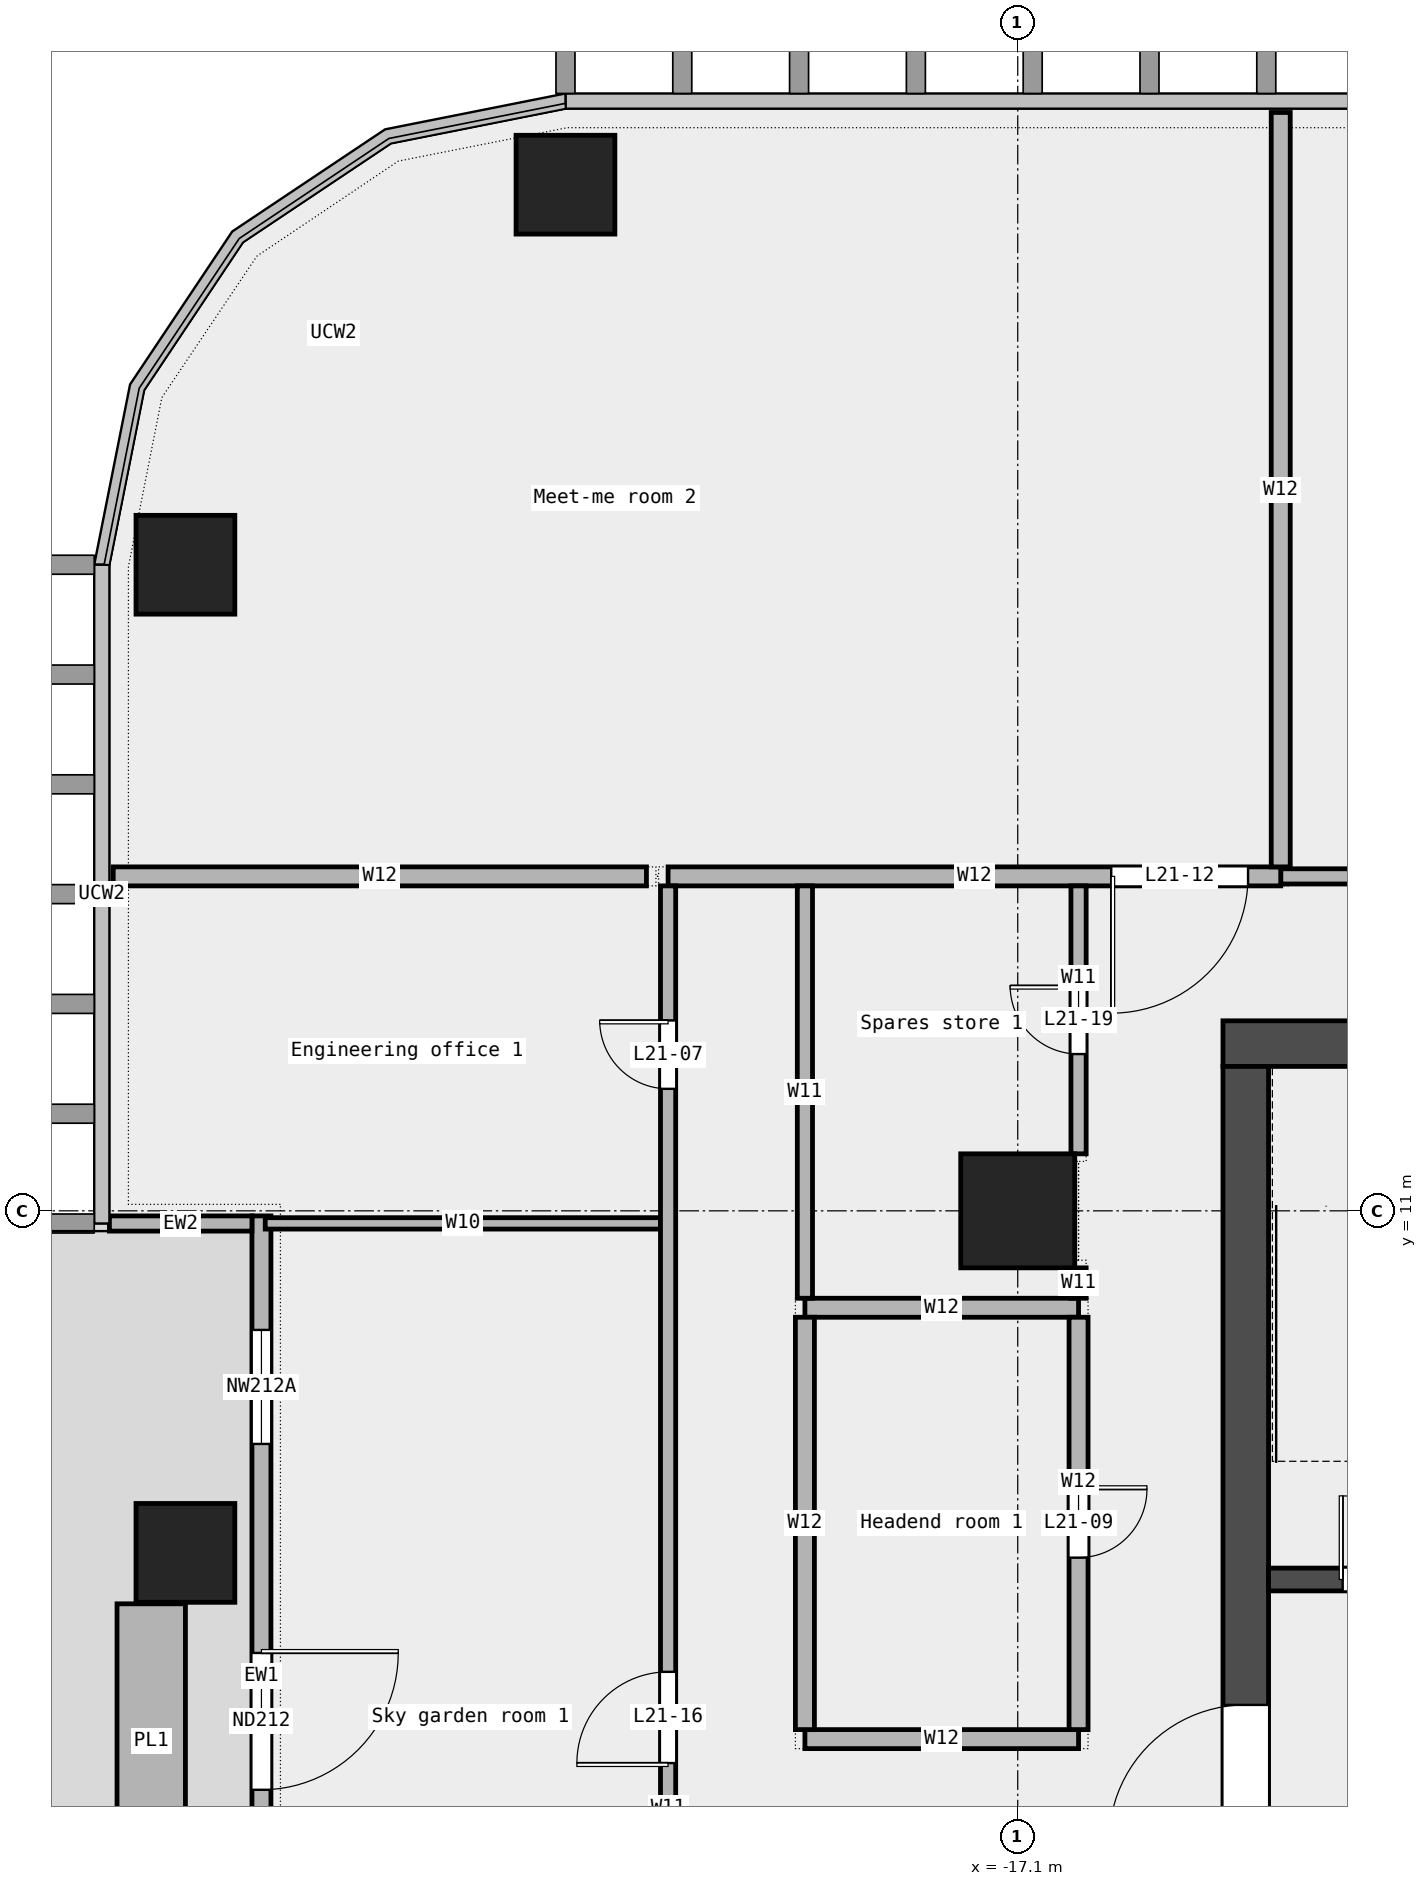
"""IFC4 building model, lengths in metres.
Left out: names, types, materials, properties, quantities, classifications, styles, units other than length and angle.
Written with IfcOpenShell. Run it as: python <this file> out.ifc"""

import sys

from ifc_helpers import new_model, si_unit, direction, frame, frame_2d, origin, origin_2d, place, context, subcontext, project, spatial, rectangle, extrude, element, fill, save


model = new_model("IFC4")
c1 = context("Model", 3, precision=1e-05, world=origin(), true_north=direction((0.0, 1.0)))
c2 = subcontext(c1, "Body", "Model", "MODEL_VIEW")
j1 = project(units=[si_unit("LENGTHUNIT", "METRE"), si_unit("PLANEANGLEUNIT", "RADIAN")], contexts=[c1])
p1 = place(None, origin())
s1 = spatial("IfcSite", under=j1, at=p1, CompositionType="ELEMENT")
p2 = place(p1, origin())
s2 = spatial("IfcBuilding", under=s1, at=p2, CompositionType="ELEMENT")
p3 = place(p2, frame((0.0, 0.0, 108.1)))
s3 = spatial("IfcBuildingStorey", under=s2, at=p3, CompositionType="ELEMENT", Elevation=108.1)
for number, where, z_axis, x_axis in (
    (1, (-23.05, 24.5, 0.0), (0.0, 0.0, 1.0), (1.0, 0.0, 0.0)),
    (2, (-28.05, 19.5, 0.0), (0.0, 0.0, 1.0), (1.0, 0.0, 0.0)),
    (3, (-28.05, 6.5, 0.0), (0.0, 0.0, 1.0), (1.0, 0.0, 0.0)),
):
    element("IfcColumn", number, at=place(p3, frame(where, z_axis=z_axis, x_axis=x_axis)), inside=s3, PredefinedType="COLUMN", context=c2, shape_type="SweptSolid", body=[
        extrude(rectangle(XDim=1.3, YDim=1.3, at=origin_2d()), origin(), (0.0, 0.0, 1.0), 4.05),
    ])
p4 = place(p3, frame((-17.1, 11.0, 0.0), z_axis=(0.0, 0.0, 1.0), x_axis=(1.0, 0.0, 0.0)))
e4 = element("IfcColumn", 4, at=p4, inside=s3, PredefinedType="COLUMN", context=c2, shape_type="SweptSolid", body=[
    extrude(rectangle(XDim=1.5, YDim=1.5, at=origin_2d()), origin(), (0.0, 0.0, 1.0), 4.05),
])
p5 = place(p3, frame((-27.05, 10.933, 0.0), z_axis=(0.0, 0.0, 1.0), x_axis=(0.0, -1.0, 0.0)))
e5 = element("IfcWall", 5, at=p5, inside=s3, PredefinedType="STANDARD", context=c2, shape_type="SweptSolid", body=[
    extrude(rectangle(XDim=13.2, YDim=0.25, at=frame_2d((6.6, 0.0))), origin(), (0.0, 0.0, 1.0), 4.05),
])
p6 = place(p5, frame((1.5, 0.0, 0.45)))
e6 = element("IfcOpeningElement", 6, at=p6, cuts=e5, PredefinedType="OPENING", context=c2, shape_type="SweptSolid", body=[
    extrude(rectangle(XDim=1.5, YDim=3.0, at=frame_2d((0.75, 1.5))), frame((0.0, 0.137, 0.0), z_axis=(0.0, -1.0, 0.0), x_axis=(1.0, 0.0, 0.0)), (0.0, 0.0, 1.0), 0.274),
])
p7 = place(p5, frame((5.75, 0.0, 0.0)))
e7 = element("IfcOpeningElement", 7, at=p7, cuts=e5, PredefinedType="OPENING", context=c2, shape_type="SweptSolid", body=[
    extrude(rectangle(XDim=1.8, YDim=2.4, at=frame_2d((0.9, 1.2))), frame((0.0, 0.137, 0.0), z_axis=(0.0, -1.0, 0.0), x_axis=(1.0, 0.0, 0.0)), (0.0, 0.0, 1.0), 0.274),
])
p8 = place(p5, frame((10.25, 0.0, 0.45)))
e8 = element("IfcOpeningElement", 8, at=p8, cuts=e5, PredefinedType="OPENING", context=c2, shape_type="SweptSolid", body=[
    extrude(rectangle(XDim=1.5, YDim=3.0, at=frame_2d((0.75, 1.5))), frame((0.0, 0.137, 0.0), z_axis=(0.0, -1.0, 0.0), x_axis=(1.0, 0.0, 0.0)), (0.0, 0.0, 1.0), 0.274),
])
p9 = place(p3, frame((-29.05, 10.833, 0.0), z_axis=(0.0, 0.0, 1.0), x_axis=(1.0, 0.0, 0.0)))
e9 = element("IfcWall", 9, at=p9, inside=s3, PredefinedType="STANDARD", context=c2, shape_type="SweptSolid", body=[
    extrude(rectangle(XDim=1.875, YDim=0.2, at=frame_2d((0.938, 0.0))), origin(), (0.0, 0.0, 1.0), 4.05),
])
p10 = place(p3, frame((-28.5, 5.83, 0.0), z_axis=(0.0, 0.0, 1.0), x_axis=(0.0, -1.0, 0.0)))
e10 = element("IfcWall", 10, at=p10, inside=s3, PredefinedType="STANDARD", context=c2, shape_type="SweptSolid", body=[
    extrude(rectangle(XDim=3.6, YDim=0.9, at=frame_2d((1.8, 0.0))), origin(), (0.0, 0.0, 1.0), 0.7),
])
for number, where, z_axis, x_axis in (
    (11, (-19.9, 4.05, 0.0), (0.0, 0.0, 1.0), (1.0, 0.0, 0.0)),
    (12, (-19.9, 9.725, 0.0), (0.0, 0.0, 1.0), (1.0, 0.0, 0.0)),
):
    element("IfcWall", number, at=place(p3, frame(where, z_axis=z_axis, x_axis=x_axis)), inside=s3, PredefinedType="PARTITIONING", context=c2, shape_type="SweptSolid", body=[
        extrude(rectangle(XDim=3.6, YDim=0.25, at=frame_2d((1.8, 0.0))), origin(), (0.0, 0.0, 1.0), 4.05),
    ])
p11 = place(p3, frame((-27.0, 10.835, 0.0), z_axis=(0.0, 0.0, 1.0), x_axis=(1.0, 0.0, 0.0)))
e13 = element("IfcWall", 13, at=p11, inside=s3, PredefinedType="PARTITIONING", context=c2, shape_type="SweptSolid", body=[
    extrude(rectangle(XDim=5.2, YDim=0.15, at=frame_2d((2.6, 0.0))), origin(), (0.0, 0.0, 1.0), 4.05),
])
p12 = place(p3, frame((-13.64, 15.4, 0.0), z_axis=(0.0, 0.0, 1.0), x_axis=(1.0, 0.0, 0.0)))
e14 = element("IfcWall", 14, at=p12, inside=s3, PredefinedType="PARTITIONING", context=c2, shape_type="SweptSolid", body=[
    extrude(rectangle(XDim=12.125, YDim=0.2, at=frame_2d((6.062, 0.0))), origin(), (0.0, 0.0, 1.0), 4.05),
])
p13 = place(p12, frame((5.312, 0.0, 0.0)))
e15 = element("IfcOpeningElement", 15, at=p13, cuts=e14, PredefinedType="OPENING", context=c2, shape_type="SweptSolid", body=[
    extrude(rectangle(XDim=1.5, YDim=2.1, at=frame_2d((0.75, 1.05))), frame((0.0, 0.112, 0.0), z_axis=(0.0, -1.0, 0.0), x_axis=(1.0, 0.0, 0.0)), (0.0, 0.0, 1.0), 0.224),
])
p14 = place(p3, frame((-29.0, 15.4, 0.0), z_axis=(0.0, 0.0, 1.0), x_axis=(1.0, 0.0, 0.0)))
e16 = element("IfcWall", 16, at=p14, inside=s3, PredefinedType="PARTITIONING", context=c2, shape_type="SweptSolid", body=[
    extrude(rectangle(XDim=7.015, YDim=0.25, at=frame_2d((3.507, 0.0))), origin(), (0.0, 0.0, 1.0), 4.05),
])
p15 = place(p3, frame((-21.7, 15.4, 0.0), z_axis=(0.0, 0.0, 1.0), x_axis=(1.0, 0.0, 0.0)))
e17 = element("IfcWall", 17, at=p15, inside=s3, PredefinedType="PARTITIONING", context=c2, shape_type="SweptSolid", body=[
    extrude(rectangle(XDim=8.06, YDim=0.25, at=frame_2d((4.03, 0.0))), origin(), (0.0, 0.0, 1.0), 4.05),
])
p16 = place(p15, frame((5.83, 0.0, 0.0)))
e18 = element("IfcOpeningElement", 18, at=p16, cuts=e17, PredefinedType="OPENING", context=c2, shape_type="SweptSolid", body=[
    extrude(rectangle(XDim=1.8, YDim=2.1, at=frame_2d((0.9, 1.05))), frame((0.0, 0.137, 0.0), z_axis=(0.0, -1.0, 0.0), x_axis=(1.0, 0.0, 0.0)), (0.0, 0.0, 1.0), 0.274),
])
p17 = place(p3, frame((-21.7, -8.975, 0.0), z_axis=(0.0, 0.0, 1.0), x_axis=(0.0, 1.0, 0.0)))
e19 = element("IfcWall", 19, at=p17, inside=s3, PredefinedType="PARTITIONING", context=c2, shape_type="SweptSolid", body=[
    extrude(rectangle(XDim=24.25, YDim=0.2, at=frame_2d((12.125, 0.0))), origin(), (0.0, 0.0, 1.0), 4.05),
])
p18 = place(p17, frame((2.805, 0.0, 0.0)))
e20 = element("IfcOpeningElement", 20, at=p18, cuts=e19, PredefinedType="OPENING", context=c2, shape_type="SweptSolid", body=[
    extrude(rectangle(XDim=1.2, YDim=2.1, at=frame_2d((0.6, 1.05))), frame((0.0, 0.112, 0.0), z_axis=(0.0, -1.0, 0.0), x_axis=(1.0, 0.0, 0.0)), (0.0, 0.0, 1.0), 0.224),
])
p19 = place(p17, frame((21.58, 0.0, 0.0)))
e21 = element("IfcOpeningElement", 21, at=p19, cuts=e19, PredefinedType="OPENING", context=c2, shape_type="SweptSolid", body=[
    extrude(rectangle(XDim=0.9, YDim=2.1, at=frame_2d((0.45, 1.05))), frame((0.0, 0.112, 0.0), z_axis=(0.0, -1.0, 0.0), x_axis=(1.0, 0.0, 0.0)), (0.0, 0.0, 1.0), 0.224),
])
p20 = place(p17, frame((12.71, 0.0, 0.0)))
e22 = element("IfcOpeningElement", 22, at=p20, cuts=e19, PredefinedType="OPENING", context=c2, shape_type="SweptSolid", body=[
    extrude(rectangle(XDim=1.2, YDim=2.1, at=frame_2d((0.6, 1.05))), frame((0.0, 0.112, 0.0), z_axis=(0.0, -1.0, 0.0), x_axis=(1.0, 0.0, 0.0)), (0.0, 0.0, 1.0), 0.224),
])
p21 = place(p3, frame((-19.9, 9.85, 0.0), z_axis=(0.0, 0.0, 1.0), x_axis=(0.0, 1.0, 0.0)))
e23 = element("IfcWall", 23, at=p21, inside=s3, PredefinedType="PARTITIONING", context=c2, shape_type="SweptSolid", body=[
    extrude(rectangle(XDim=5.425, YDim=0.2, at=frame_2d((2.712, 0.0))), origin(), (0.0, 0.0, 1.0), 4.05),
])
p22 = place(p3, frame((-19.9, 4.175, 0.0), z_axis=(0.0, 0.0, 1.0), x_axis=(0.0, 1.0, 0.0)))
e24 = element("IfcWall", 24, at=p22, inside=s3, PredefinedType="PARTITIONING", context=c2, shape_type="SweptSolid", body=[
    extrude(rectangle(XDim=5.425, YDim=0.25, at=frame_2d((2.712, 0.0))), origin(), (0.0, 0.0, 1.0), 4.05),
])
p23 = place(p3, frame((-16.3, 9.85, 0.0), z_axis=(0.0, 0.0, 1.0), x_axis=(0.0, 1.0, 0.0)))
e25 = element("IfcWall", 25, at=p23, inside=s3, PredefinedType="PARTITIONING", context=c2, shape_type="SweptSolid", body=[
    extrude(rectangle(XDim=0.4, YDim=0.2, at=frame_2d((0.2, 0.0))), origin(), (0.0, 0.0, 1.0), 4.05),
])
p24 = place(p3, frame((-16.3, 11.75, 0.0), z_axis=(0.0, 0.0, 1.0), x_axis=(0.0, 1.0, 0.0)))
e26 = element("IfcWall", 26, at=p24, inside=s3, PredefinedType="PARTITIONING", context=c2, shape_type="SweptSolid", body=[
    extrude(rectangle(XDim=3.525, YDim=0.2, at=frame_2d((1.762, 0.0))), origin(), (0.0, 0.0, 1.0), 4.05),
])
p25 = place(p24, frame((1.312, 0.0, 0.0)))
e27 = element("IfcOpeningElement", 27, at=p25, cuts=e26, PredefinedType="OPENING", context=c2, shape_type="SweptSolid", body=[
    extrude(rectangle(XDim=0.9, YDim=2.1, at=frame_2d((0.45, 1.05))), frame((0.0, 0.112, 0.0), z_axis=(0.0, -1.0, 0.0), x_axis=(1.0, 0.0, 0.0)), (0.0, 0.0, 1.0), 0.224),
])
p26 = place(p3, frame((-16.3, 4.175, 0.0), z_axis=(0.0, 0.0, 1.0), x_axis=(0.0, 1.0, 0.0)))
e28 = element("IfcWall", 28, at=p26, inside=s3, PredefinedType="PARTITIONING", context=c2, shape_type="SweptSolid", body=[
    extrude(rectangle(XDim=5.425, YDim=0.25, at=frame_2d((2.712, 0.0))), origin(), (0.0, 0.0, 1.0), 4.05),
])
p27 = place(p26, frame((2.262, 0.0, 0.0)))
e29 = element("IfcOpeningElement", 29, at=p27, cuts=e28, PredefinedType="OPENING", context=c2, shape_type="SweptSolid", body=[
    extrude(rectangle(XDim=0.9, YDim=2.1, at=frame_2d((0.45, 1.05))), frame((0.0, 0.137, 0.0), z_axis=(0.0, -1.0, 0.0), x_axis=(1.0, 0.0, 0.0)), (0.0, 0.0, 1.0), 0.274),
])
p28 = place(p3, frame((-13.64, 15.525, 0.0), z_axis=(0.0, 0.0, 1.0), x_axis=(0.0, 1.0, 0.0)))
e30 = element("IfcWall", 30, at=p28, inside=s3, PredefinedType="PARTITIONING", context=c2, shape_type="SweptSolid", body=[
    extrude(rectangle(XDim=9.925, YDim=0.25, at=frame_2d((4.962, 0.0))), origin(), (0.0, 0.0, 1.0), 4.05),
])
p29 = place(p3, frame((-14.4, 13.2, 0.0), z_axis=(0.0, 0.0, 1.0), x_axis=(1.0, 0.0, 0.0)))
e31 = element("IfcWall", 31, at=p29, inside=s3, PredefinedType="SHEAR", context=c2, shape_type="SweptSolid", body=[
    extrude(rectangle(XDim=28.8, YDim=0.6, at=frame_2d((14.4, 0.0))), origin(), (0.0, 0.0, 1.0), 4.2),
])
p30 = place(p29, frame((6.775, 0.0, 0.0)))
e32 = element("IfcOpeningElement", 32, at=p30, cuts=e31, PredefinedType="OPENING", context=c2, shape_type="SweptSolid", body=[
    extrude(rectangle(XDim=1.0, YDim=2.1, at=frame_2d((0.5, 1.05))), frame((0.0, 0.312, 0.0), z_axis=(0.0, -1.0, 0.0), x_axis=(1.0, 0.0, 0.0)), (0.0, 0.0, 1.0), 0.624),
])
p31 = place(p29, frame((13.525, 0.0, 0.0)))
e33 = element("IfcOpeningElement", 33, at=p31, cuts=e31, PredefinedType="OPENING", context=c2, shape_type="SweptSolid", body=[
    extrude(rectangle(XDim=1.0, YDim=2.1, at=frame_2d((0.5, 1.05))), frame((0.0, 0.312, 0.0), z_axis=(0.0, -1.0, 0.0), x_axis=(1.0, 0.0, 0.0)), (0.0, 0.0, 1.0), 0.624),
])
p32 = place(p29, frame((20.65, 0.0, 0.0)))
e34 = element("IfcOpeningElement", 34, at=p32, cuts=e31, PredefinedType="OPENING", context=c2, shape_type="SweptSolid", body=[
    extrude(rectangle(XDim=1.0, YDim=2.1, at=frame_2d((0.5, 1.05))), frame((0.0, 0.312, 0.0), z_axis=(0.0, -1.0, 0.0), x_axis=(1.0, 0.0, 0.0)), (0.0, 0.0, 1.0), 0.624),
])
p33 = place(p3, frame((-14.1, -6.6, 0.0), z_axis=(0.0, 0.0, 1.0), x_axis=(0.0, 1.0, 0.0)))
e35 = element("IfcWall", 35, at=p33, inside=s3, PredefinedType="SHEAR", context=c2, shape_type="SweptSolid", body=[
    extrude(rectangle(XDim=19.5, YDim=0.6, at=frame_2d((9.75, 0.0))), origin(), (0.0, 0.0, 1.0), 4.2),
])
p34 = place(p33, frame((9.3, 0.0, 0.0)))
e36 = element("IfcOpeningElement", 36, at=p34, cuts=e35, PredefinedType="OPENING", context=c2, shape_type="SweptSolid", body=[
    extrude(rectangle(XDim=1.8, YDim=2.1, at=frame_2d((0.9, 1.05))), frame((0.0, 0.312, 0.0), z_axis=(0.0, -1.0, 0.0), x_axis=(1.0, 0.0, 0.0)), (0.0, 0.0, 1.0), 0.624),
])
p35 = place(p3, frame((-13.8, 6.15, 0.0), z_axis=(0.0, 0.0, 1.0), x_axis=(1.0, 0.0, 0.0)))
e37 = element("IfcWall", 37, at=p35, inside=s3, PredefinedType="SOLIDWALL", context=c2, shape_type="SweptSolid", body=[
    extrude(rectangle(XDim=3.15, YDim=0.3, at=frame_2d((1.575, 0.0))), origin(), (0.0, 0.0, 1.0), 4.2),
])
p36 = place(p35, frame((0.975, 0.0, 0.0)))
e38 = element("IfcOpeningElement", 38, at=p36, cuts=e37, PredefinedType="OPENING", context=c2, shape_type="SweptSolid", body=[
    extrude(rectangle(XDim=1.1, YDim=2.1, at=frame_2d((0.55, 1.05))), frame((0.0, 0.162, 0.0), z_axis=(0.0, -1.0, 0.0), x_axis=(1.0, 0.0, 0.0)), (0.0, 0.0, 1.0), 0.324),
])
p37 = place(p6, origin())
e39 = element("IfcWindow", 39, at=p37, inside=s3, PartitioningType="SINGLE_PANEL", PredefinedType="WINDOW", context=c2, shape_type="SweptSolid", body=[
    extrude(rectangle(XDim=1.5, YDim=3.0, at=frame_2d((0.75, 1.5))), frame((0.0, 0.03, 0.0), z_axis=(0.0, -1.0, 0.0), x_axis=(1.0, 0.0, 0.0)), (0.0, 0.0, 1.0), 0.06),
])
fill(e6, e39)
p38 = place(p7, origin())
e40 = element("IfcDoor", 40, at=p38, inside=s3, OperationType="DOUBLE_DOOR_SINGLE_SWING", PredefinedType="DOOR", context=c2, shape_type="SweptSolid", body=[
    extrude(rectangle(XDim=1.8, YDim=2.4, at=frame_2d((0.9, 1.2))), frame((0.0, 0.025, 0.0), z_axis=(0.0, -1.0, 0.0), x_axis=(1.0, 0.0, 0.0)), (0.0, 0.0, 1.0), 0.05),
])
fill(e7, e40)
p39 = place(p19, origin())
e41 = element("IfcDoor", 41, at=p39, inside=s3, OperationType="SINGLE_SWING_RIGHT", PredefinedType="DOOR", context=c2, shape_type="SweptSolid", body=[
    extrude(rectangle(XDim=0.9, YDim=2.1, at=frame_2d((0.45, 1.05))), frame((0.0, 0.025, 0.0), z_axis=(0.0, -1.0, 0.0), x_axis=(1.0, 0.0, 0.0)), (0.0, 0.0, 1.0), 0.05),
])
fill(e21, e41)
p40 = place(p27, origin())
e42 = element("IfcDoor", 42, at=p40, inside=s3, OperationType="SINGLE_SWING_LEFT", PredefinedType="DOOR", context=c2, shape_type="SweptSolid", body=[
    extrude(rectangle(XDim=0.9, YDim=2.1, at=frame_2d((0.45, 1.05))), frame((0.0, 0.025, 0.0), z_axis=(0.0, -1.0, 0.0), x_axis=(1.0, 0.0, 0.0)), (0.0, 0.0, 1.0), 0.05),
])
fill(e29, e42)
p41 = place(p16, origin())
e43 = element("IfcDoor", 43, at=p41, inside=s3, OperationType="DOUBLE_DOOR_SINGLE_SWING", PredefinedType="DOOR", context=c2, shape_type="SweptSolid", body=[
    extrude(rectangle(XDim=1.8, YDim=2.1, at=frame_2d((0.9, 1.05))), frame((0.0, 0.025, 0.0), z_axis=(0.0, -1.0, 0.0), x_axis=(1.0, 0.0, 0.0)), (0.0, 0.0, 1.0), 0.05),
])
fill(e18, e43)
p42 = place(p20, origin())
e44 = element("IfcDoor", 44, at=p42, inside=s3, OperationType="SINGLE_SWING_LEFT", PredefinedType="DOOR", context=c2, shape_type="SweptSolid", body=[
    extrude(rectangle(XDim=1.2, YDim=2.1, at=frame_2d((0.6, 1.05))), frame((0.0, 0.025, 0.0), z_axis=(0.0, -1.0, 0.0), x_axis=(1.0, 0.0, 0.0)), (0.0, 0.0, 1.0), 0.05),
])
fill(e22, e44)
p43 = place(p25, origin())
e45 = element("IfcDoor", 45, at=p43, inside=s3, OperationType="SINGLE_SWING_RIGHT", PredefinedType="DOOR", context=c2, shape_type="SweptSolid", body=[
    extrude(rectangle(XDim=0.9, YDim=2.1, at=frame_2d((0.45, 1.05))), frame((0.0, 0.025, 0.0), z_axis=(0.0, -1.0, 0.0), x_axis=(1.0, 0.0, 0.0)), (0.0, 0.0, 1.0), 0.05),
])
fill(e27, e45)
p44 = place(p36, origin())
e46 = element("IfcDoor", 46, at=p44, inside=s3, OperationType="SINGLE_SWING_LEFT", PredefinedType="DOOR", context=c2, shape_type="SweptSolid", body=[
    extrude(rectangle(XDim=1.1, YDim=2.1, at=frame_2d((0.55, 1.05))), frame((0.0, 0.025, 0.0), z_axis=(0.0, -1.0, 0.0), x_axis=(1.0, 0.0, 0.0)), (0.0, 0.0, 1.0), 0.05),
])
fill(e38, e46)
p45 = place(p34, origin())
e47 = element("IfcDoor", 47, at=p45, inside=s3, OperationType="DOUBLE_DOOR_SINGLE_SWING", PredefinedType="DOOR", context=c2, shape_type="SweptSolid", body=[
    extrude(rectangle(XDim=1.8, YDim=2.1, at=frame_2d((0.9, 1.05))), frame((0.0, 0.025, 0.0), z_axis=(0.0, -1.0, 0.0), x_axis=(1.0, 0.0, 0.0)), (0.0, 0.0, 1.0), 0.05),
])
fill(e36, e47)
save(model, sys.argv[1])
